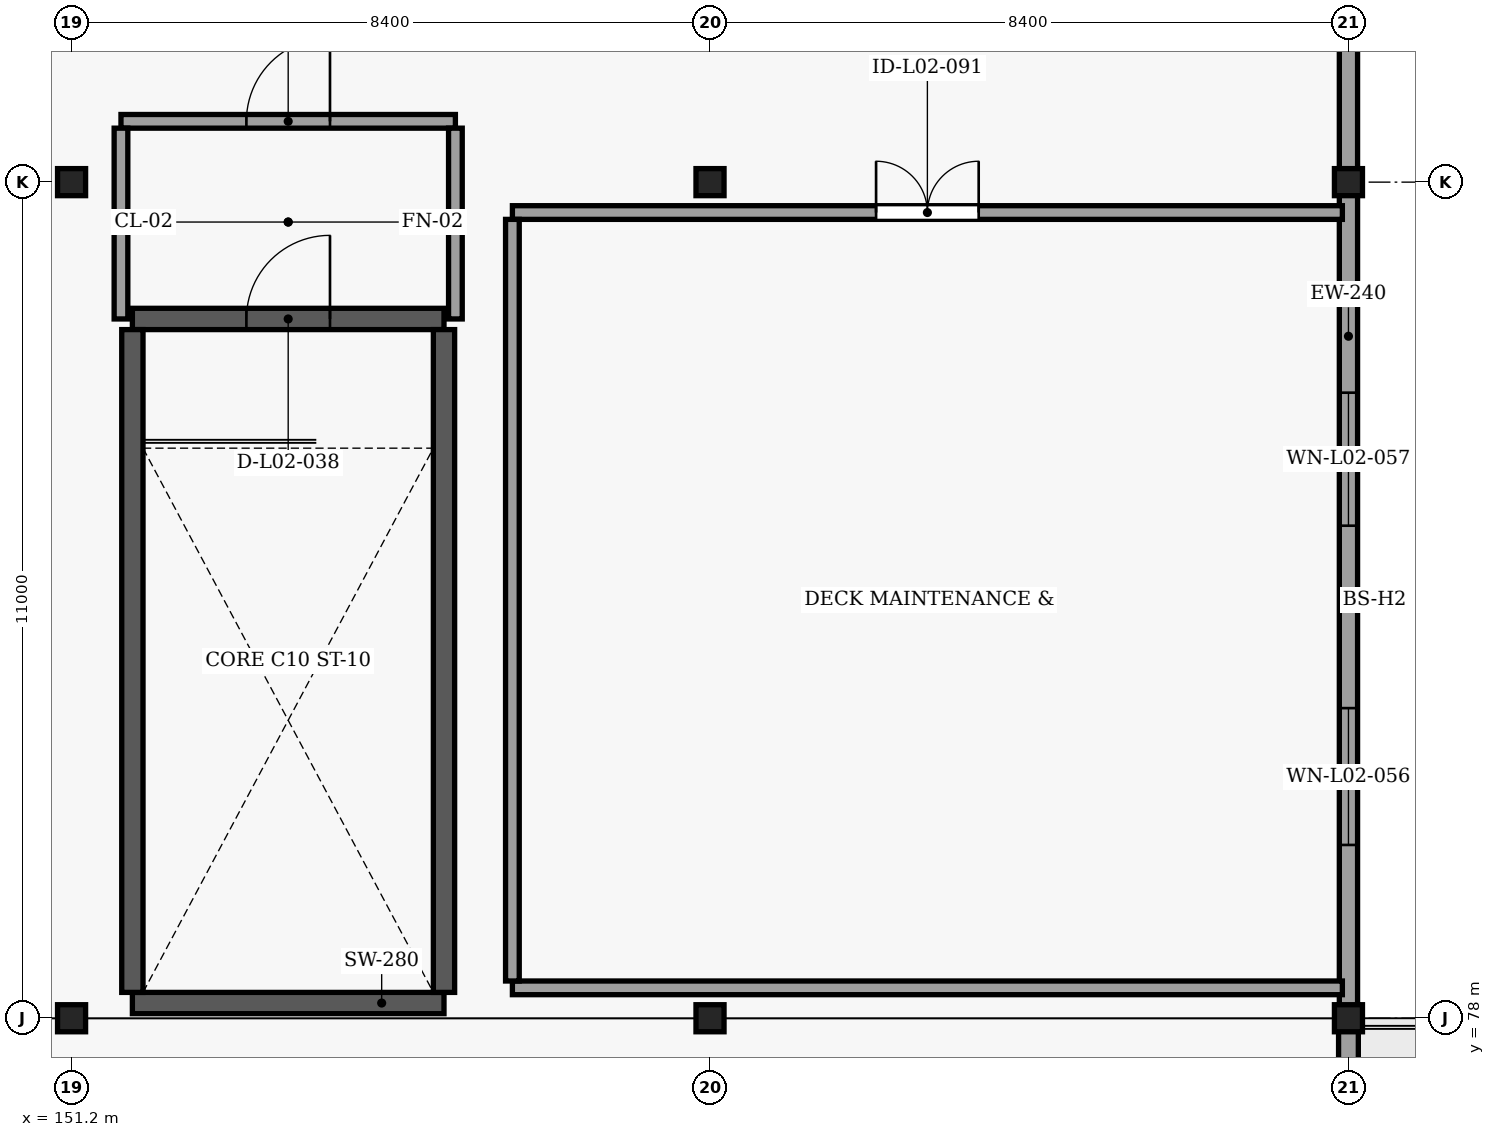
"""IFC4 building model, lengths in metres.
Left out: names, types, materials, properties, quantities, classifications, styles, units other than length and angle.
Written with IfcOpenShell. Run it as: python <this file> out.ifc"""

import sys

from ifc_helpers import new_model, si_unit, direction, frame, frame_2d, origin, origin_2d, place, context, subcontext, project, spatial, rectangle, i_section, extrude, element, fill, save


model = new_model("IFC4")
c1 = context("Model", 3, precision=1e-05, world=origin(), true_north=direction((0.0, 1.0)))
c2 = subcontext(c1, "Body", "Model", "MODEL_VIEW")
j1 = project(units=[si_unit("LENGTHUNIT", "METRE"), si_unit("PLANEANGLEUNIT", "RADIAN")], contexts=[c1])
p1 = place(None, origin())
s1 = spatial("IfcSite", under=j1, at=p1, CompositionType="ELEMENT")
p2 = place(p1, origin())
s2 = spatial("IfcBuilding", under=s1, at=p2, CompositionType="ELEMENT")
p3 = place(p2, frame((0.0, 0.0, 5.4)))
s3 = spatial("IfcBuildingStorey", under=s2, at=p3, CompositionType="ELEMENT", Elevation=5.4)
for number, where, z_axis, x_axis in (
    (1, (151.2, 78.0, 0.0), (0.0, 0.0, 1.0), (1.0, 0.0, 0.0)),
    (2, (159.6, 78.0, 0.0), (0.0, 0.0, 1.0), (1.0, 0.0, 0.0)),
    (3, (168.0, 78.0, 0.0), (0.0, 0.0, 1.0), (1.0, 0.0, 0.0)),
    (4, (151.2, 89.0, 0.0), (0.0, 0.0, 1.0), (1.0, 0.0, 0.0)),
    (5, (159.6, 89.0, 0.0), (0.0, 0.0, 1.0), (1.0, 0.0, 0.0)),
    (6, (168.0, 89.0, 0.0), (0.0, 0.0, 1.0), (1.0, 0.0, 0.0)),
):
    element("IfcColumn", number, at=place(p3, frame(where, z_axis=z_axis, x_axis=x_axis)), inside=s3, PredefinedType="COLUMN", context=c2, shape_type="SweptSolid", body=[
        extrude(i_section(OverallWidth=0.369, OverallDepth=0.356, WebThickness=0.011, FlangeThickness=0.018, FilletRadius=0.015, at=origin_2d()), origin(), (0.0, 0.0, 1.0), 4.45),
    ])
p4 = place(p3, frame((152.0, 78.2, 0.0), z_axis=(0.0, 0.0, 1.0), x_axis=(1.0, 0.0, 0.0)))
e7 = element("IfcWall", 7, at=p4, inside=s3, PredefinedType="SHEAR", context=c2, shape_type="SweptSolid", body=[
    extrude(rectangle(XDim=4.1, YDim=0.28, at=frame_2d((2.05, 0.0))), origin(), (0.0, 0.0, 1.0), 5.7),
])
p5 = place(p3, frame((152.0, 87.2, 0.0), z_axis=(0.0, 0.0, 1.0), x_axis=(1.0, 0.0, 0.0)))
e8 = element("IfcWall", 8, at=p5, inside=s3, PredefinedType="SHEAR", context=c2, shape_type="SweptSolid", body=[
    extrude(rectangle(XDim=4.1, YDim=0.28, at=frame_2d((2.05, 0.0))), origin(), (0.0, 0.0, 1.0), 5.7),
])
p6 = place(p5, frame((1.5, 0.0, 0.0)))
e9 = element("IfcOpeningElement", 9, at=p6, cuts=e8, PredefinedType="OPENING", context=c2, shape_type="SweptSolid", body=[
    extrude(rectangle(XDim=1.1, YDim=2.2, at=frame_2d((0.55, 1.1))), frame((0.0, 0.15, 0.0), z_axis=(0.0, -1.0, 0.0), x_axis=(1.0, 0.0, 0.0)), (0.0, 0.0, 1.0), 0.3),
])
for number, where, z_axis, x_axis in (
    (10, (152.0, 78.34, 0.0), (0.0, 0.0, 1.0), (0.0, 1.0, 0.0)),
    (11, (156.1, 78.34, 0.0), (0.0, 0.0, 1.0), (0.0, 1.0, 0.0)),
):
    element("IfcWall", number, at=place(p3, frame(where, z_axis=z_axis, x_axis=x_axis)), inside=s3, PredefinedType="SHEAR", context=c2, shape_type="SweptSolid", body=[
        extrude(rectangle(XDim=8.72, YDim=0.28, at=frame_2d((4.36, 0.0))), origin(), (0.0, 0.0, 1.0), 5.7),
    ])
p7 = place(p3, frame((168.0, 66.285, 0.0), z_axis=(0.0, 0.0, 1.0), x_axis=(0.0, 1.0, 0.0)))
e12 = element("IfcWall", 12, at=p7, inside=s3, PredefinedType="SOLIDWALL", context=c2, shape_type="SweptSolid", body=[
    extrude(rectangle(XDim=11.89, YDim=0.26, at=frame_2d((5.945, 0.0))), origin(), (0.0, 0.0, 1.0), 3.988),
])
p8 = place(p7, frame((3.435, 0.0, 0.0)))
e13 = element("IfcOpeningElement", 13, at=p8, cuts=e12, PredefinedType="OPENING", context=c2, shape_type="SweptSolid", body=[
    extrude(rectangle(XDim=4.5, YDim=3.8, at=frame_2d((2.25, 1.9))), frame((0.0, 0.14, 0.0), z_axis=(0.0, -1.0, 0.0), x_axis=(1.0, 0.0, 0.0)), (0.0, 0.0, 1.0), 0.28),
])
p9 = place(p3, frame((168.0, 78.163, 0.0), z_axis=(0.0, 0.0, 1.0), x_axis=(0.0, 1.0, 0.0)))
e14 = element("IfcWall", 14, at=p9, inside=s3, PredefinedType="ELEMENTEDWALL", context=c2, shape_type="SweptSolid", body=[
    extrude(rectangle(XDim=11.012, YDim=0.24, at=frame_2d((5.506, 0.0))), origin(), (0.0, 0.0, 1.0), 4.031),
])
p10 = place(p9, frame((2.117, 0.0, 0.95)))
e15 = element("IfcOpeningElement", 15, at=p10, cuts=e14, PredefinedType="OPENING", context=c2, shape_type="SweptSolid", body=[
    extrude(rectangle(XDim=1.8, YDim=1.6, at=frame_2d((0.9, 0.8))), frame((0.0, 0.13, 0.0), z_axis=(0.0, -1.0, 0.0), x_axis=(1.0, 0.0, 0.0)), (0.0, 0.0, 1.0), 0.26),
])
p11 = place(p9, frame((6.317, 0.0, 0.95)))
e16 = element("IfcOpeningElement", 16, at=p11, cuts=e14, PredefinedType="OPENING", context=c2, shape_type="SweptSolid", body=[
    extrude(rectangle(XDim=1.75, YDim=1.55, at=frame_2d((0.875, 0.775))), frame((0.0, 0.13, 0.0), z_axis=(0.0, -1.0, 0.0), x_axis=(1.0, 0.0, 0.0)), (0.0, 0.0, 1.0), 0.26),
])
p12 = place(p3, frame((168.0, 89.163, 0.0), z_axis=(0.0, 0.0, 1.0), x_axis=(0.0, 1.0, 0.0)))
e17 = element("IfcWall", 17, at=p12, inside=s3, PredefinedType="ELEMENTEDWALL", context=c2, shape_type="SweptSolid", body=[
    extrude(rectangle(XDim=11.012, YDim=0.24, at=frame_2d((5.506, 0.0))), origin(), (0.0, 0.0, 1.0), 4.031),
])
p13 = place(p12, frame((2.117, 0.0, 0.95)))
e18 = element("IfcOpeningElement", 18, at=p13, cuts=e17, PredefinedType="OPENING", context=c2, shape_type="SweptSolid", body=[
    extrude(rectangle(XDim=1.8, YDim=1.6, at=frame_2d((0.9, 0.8))), frame((0.0, 0.13, 0.0), z_axis=(0.0, -1.0, 0.0), x_axis=(1.0, 0.0, 0.0)), (0.0, 0.0, 1.0), 0.26),
])
p14 = place(p12, frame((6.317, 0.0, 0.95)))
e19 = element("IfcOpeningElement", 19, at=p14, cuts=e17, PredefinedType="OPENING", context=c2, shape_type="SweptSolid", body=[
    extrude(rectangle(XDim=1.75, YDim=1.55, at=frame_2d((0.875, 0.775))), frame((0.0, 0.13, 0.0), z_axis=(0.0, -1.0, 0.0), x_axis=(1.0, 0.0, 0.0)), (0.0, 0.0, 1.0), 0.26),
])
p15 = place(p3, frame((151.85, 89.8, 0.0), z_axis=(0.0, 0.0, 1.0), x_axis=(1.0, 0.0, 0.0)))
e20 = element("IfcWall", 20, at=p15, inside=s3, PredefinedType="SOLIDWALL", context=c2, shape_type="SweptSolid", body=[
    extrude(rectangle(XDim=4.4, YDim=0.18, at=frame_2d((2.2, 0.0))), origin(), (0.0, 0.0, 1.0), 4.45),
])
p16 = place(p15, frame((1.65, 0.0, 0.0)))
e21 = element("IfcOpeningElement", 21, at=p16, cuts=e20, PredefinedType="OPENING", context=c2, shape_type="SweptSolid", body=[
    extrude(rectangle(XDim=1.1, YDim=2.2, at=frame_2d((0.55, 1.1))), frame((0.0, 0.1, 0.0), z_axis=(0.0, -1.0, 0.0), x_axis=(1.0, 0.0, 0.0)), (0.0, 0.0, 1.0), 0.2),
])
for number, where, z_axis, x_axis in (
    (22, (151.85, 87.2, 0.0), (0.0, 0.0, 1.0), (0.0, 1.0, 0.0)),
    (23, (156.25, 87.2, 0.0), (0.0, 0.0, 1.0), (0.0, 1.0, 0.0)),
):
    element("IfcWall", number, at=place(p3, frame(where, z_axis=z_axis, x_axis=x_axis)), inside=s3, PredefinedType="SOLIDWALL", context=c2, shape_type="SweptSolid", body=[
        extrude(rectangle(XDim=2.51, YDim=0.18, at=frame_2d((1.255, 0.0))), origin(), (0.0, 0.0, 1.0), 3.99),
    ])
p17 = place(p3, frame((157.0, 78.4, 0.0), z_axis=(0.0, 0.0, 1.0), x_axis=(1.0, 0.0, 0.0)))
e24 = element("IfcWall", 24, at=p17, inside=s3, PredefinedType="SOLIDWALL", context=c2, shape_type="SweptSolid", body=[
    extrude(rectangle(XDim=10.92, YDim=0.18, at=frame_2d((5.46, 0.0))), origin(), (0.0, 0.0, 1.0), 4.033),
])
p18 = place(p3, frame((157.0, 88.6, 0.0), z_axis=(0.0, 0.0, 1.0), x_axis=(1.0, 0.0, 0.0)))
e25 = element("IfcWall", 25, at=p18, inside=s3, PredefinedType="SOLIDWALL", context=c2, shape_type="SweptSolid", body=[
    extrude(rectangle(XDim=10.92, YDim=0.18, at=frame_2d((5.46, 0.0))), origin(), (0.0, 0.0, 1.0), 4.033),
])
p19 = place(p18, frame((4.785, 0.0, 0.0)))
e26 = element("IfcOpeningElement", 26, at=p19, cuts=e25, PredefinedType="OPENING", context=c2, shape_type="SweptSolid", body=[
    extrude(rectangle(XDim=1.35, YDim=2.2, at=frame_2d((0.675, 1.1))), frame((0.0, 0.1, 0.0), z_axis=(0.0, -1.0, 0.0), x_axis=(1.0, 0.0, 0.0)), (0.0, 0.0, 1.0), 0.2),
])
p20 = place(p3, frame((157.0, 78.49, 0.0), z_axis=(0.0, 0.0, 1.0), x_axis=(0.0, 1.0, 0.0)))
e27 = element("IfcWall", 27, at=p20, inside=s3, PredefinedType="SOLIDWALL", context=c2, shape_type="SweptSolid", body=[
    extrude(rectangle(XDim=10.02, YDim=0.18, at=frame_2d((5.01, 0.0))), origin(), (0.0, 0.0, 1.0), 4.137),
])
p21 = place(p6, origin())
e28 = element("IfcDoor", 28, at=p21, inside=s3, OperationType="SINGLE_SWING_RIGHT", PredefinedType="DOOR", context=c2, shape_type="SweptSolid", body=[
    extrude(rectangle(XDim=1.1, YDim=2.2, at=frame_2d((0.55, 1.1))), frame((0.0, 0.025, 0.0), z_axis=(0.0, -1.0, 0.0), x_axis=(1.0, 0.0, 0.0)), (0.0, 0.0, 1.0), 0.05),
])
fill(e9, e28)
p22 = place(p10, origin())
e29 = element("IfcWindow", 29, at=p22, inside=s3, PartitioningType="SINGLE_PANEL", PredefinedType="WINDOW", context=c2, shape_type="SweptSolid", body=[
    extrude(rectangle(XDim=1.8, YDim=1.6, at=frame_2d((0.9, 0.8))), frame((0.0, 0.03, 0.0), z_axis=(0.0, -1.0, 0.0), x_axis=(1.0, 0.0, 0.0)), (0.0, 0.0, 1.0), 0.06),
])
fill(e15, e29)
p23 = place(p11, origin())
e30 = element("IfcWindow", 30, at=p23, inside=s3, PartitioningType="SINGLE_PANEL", PredefinedType="WINDOW", context=c2, shape_type="SweptSolid", body=[
    extrude(rectangle(XDim=1.75, YDim=1.55, at=frame_2d((0.875, 0.775))), frame((0.0, 0.03, 0.0), z_axis=(0.0, -1.0, 0.0), x_axis=(1.0, 0.0, 0.0)), (0.0, 0.0, 1.0), 0.06),
])
fill(e16, e30)
p24 = place(p16, origin())
e31 = element("IfcDoor", 31, at=p24, inside=s3, OperationType="SINGLE_SWING_RIGHT", PredefinedType="DOOR", context=c2, shape_type="SweptSolid", body=[
    extrude(rectangle(XDim=1.1, YDim=2.2, at=frame_2d((0.55, 1.1))), frame((0.0, 0.025, 0.0), z_axis=(0.0, -1.0, 0.0), x_axis=(1.0, 0.0, 0.0)), (0.0, 0.0, 1.0), 0.05),
])
fill(e21, e31)
p25 = place(p19, origin())
e32 = element("IfcDoor", 32, at=p25, inside=s3, OperationType="DOUBLE_DOOR_SINGLE_SWING", PredefinedType="DOOR", context=c2, shape_type="SweptSolid", body=[
    extrude(rectangle(XDim=1.35, YDim=2.2, at=frame_2d((0.675, 1.1))), frame((0.0, 0.025, 0.0), z_axis=(0.0, -1.0, 0.0), x_axis=(1.0, 0.0, 0.0)), (0.0, 0.0, 1.0), 0.05),
])
fill(e26, e32)
save(model, sys.argv[1])
